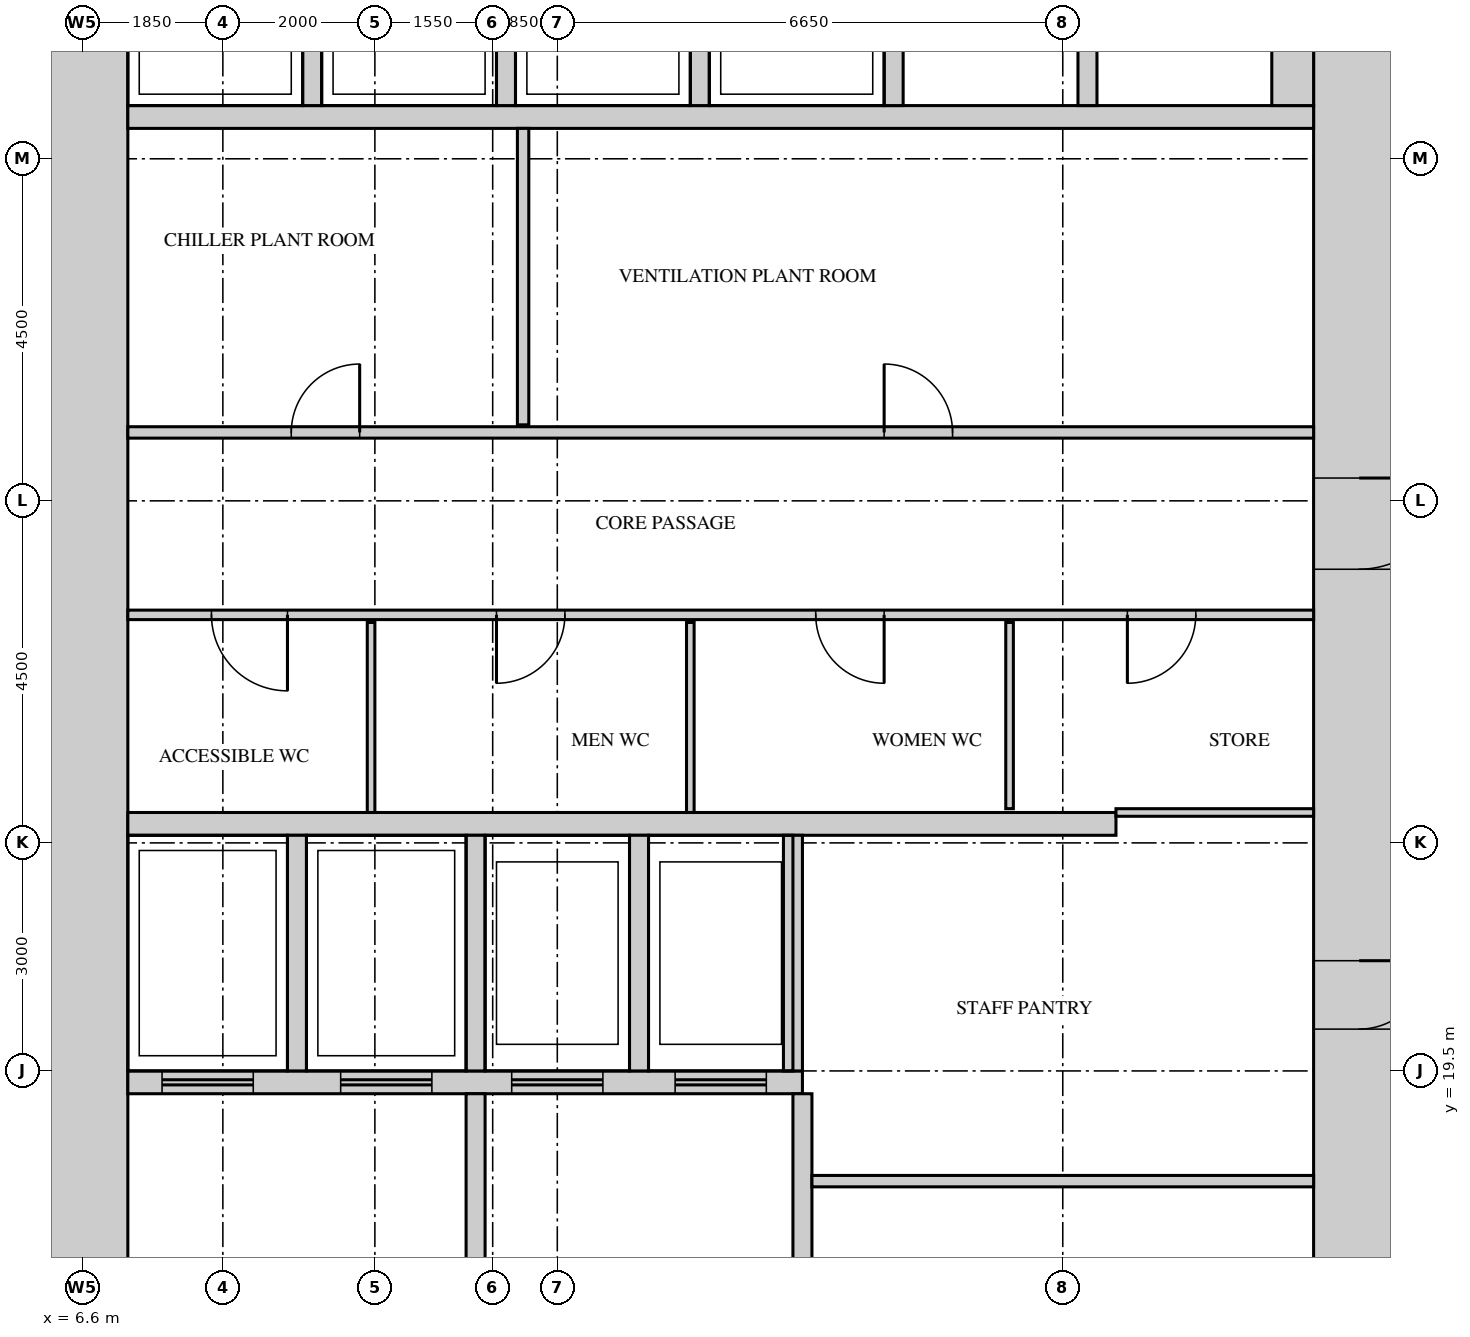
"""IFC4 building model, lengths in metres.
Left out: names, types, materials, properties, quantities, classifications, styles, units other than length and angle.
Written with IfcOpenShell. Run it as: python <this file> out.ifc"""

import sys

from ifc_helpers import new_model, si_unit, direction, frame, frame_2d, origin, place, context, subcontext, project, spatial, rectangle, extrude, source, transform, mapped, element, fill, save


model = new_model("IFC4")
c1 = context("Model", 3, precision=1e-05, world=origin(), true_north=direction((0.0, 1.0)))
c2 = subcontext(c1, "Body", "Model", "MODEL_VIEW")
j1 = project(units=[si_unit("LENGTHUNIT", "METRE"), si_unit("PLANEANGLEUNIT", "RADIAN")], contexts=[c1])
p1 = place(None, origin())
s1 = spatial("IfcSite", under=j1, at=p1, CompositionType="ELEMENT")
p2 = place(p1, origin())
s2 = spatial("IfcBuilding", under=s1, at=p2, CompositionType="ELEMENT")
p3 = place(p2, frame((0.0, 0.0, 87.0)))
s3 = spatial("IfcBuildingStorey", under=s2, at=p3, CompositionType="ELEMENT", Elevation=87.0)
m1 = source(origin(), c2, "Body", "SweptSolid", [
    extrude(rectangle(XDim=27.6, YDim=1.2, at=frame_2d((13.8, 0.0))), origin(), (0.0, 0.0, 1.0), 4.2),
])
p4 = place(p3, frame((23.4, 13.2, 0.0), z_axis=(0.0, 0.0, 1.0), x_axis=(0.0, 1.0, 0.0)))
e1 = element("IfcWall", 1, at=p4, inside=s3, PredefinedType="SHEAR", context=c2, shape_type="MappedRepresentation", body=[
    mapped(m1, transform((0.0, 0.0, 0.0))),
])
m2 = source(origin(), c2, "Body", "SweptSolid", [
    extrude(rectangle(XDim=1.8, YDim=2.1, at=frame_2d((0.9, 1.05))), frame((0.0, 0.61, 0.0), z_axis=(0.0, -1.0, 0.0), x_axis=(1.0, 0.0, 0.0)), (0.0, 0.0, 1.0), 1.22),
])
p5 = place(p4, frame((22.4, 0.0, 0.0)))
e2 = element("IfcOpeningElement", 2, at=p5, cuts=e1, PredefinedType="OPENING", context=c2, shape_type="MappedRepresentation", body=[
    mapped(m2, transform((0.0, 0.0, 0.0))),
])
m3 = source(origin(), c2, "Body", "SweptSolid", [
    extrude(rectangle(XDim=1.2, YDim=2.1, at=frame_2d((0.6, 1.05))), frame((0.0, 0.61, 0.0), z_axis=(0.0, -1.0, 0.0), x_axis=(1.0, 0.0, 0.0)), (0.0, 0.0, 1.0), 1.22),
])
p6 = place(p4, frame((12.9, 0.0, 0.0)))
e3 = element("IfcOpeningElement", 3, at=p6, cuts=e1, PredefinedType="OPENING", context=c2, shape_type="MappedRepresentation", body=[
    mapped(m3, transform((0.0, 0.0, 0.0))),
])
m4 = source(origin(), c2, "Body", "SweptSolid", [
    extrude(rectangle(XDim=0.9, YDim=2.1, at=frame_2d((0.45, 1.05))), frame((0.0, 0.61, 0.0), z_axis=(0.0, -1.0, 0.0), x_axis=(1.0, 0.0, 0.0)), (0.0, 0.0, 1.0), 1.22),
])
p7 = place(p4, frame((2.0, 0.0, 0.0)))
e4 = element("IfcOpeningElement", 4, at=p7, cuts=e1, PredefinedType="OPENING", context=c2, shape_type="MappedRepresentation", body=[
    mapped(m4, transform((0.0, 0.0, 0.0))),
])
p8 = place(p4, frame((6.85, 0.0, 0.0)))
e5 = element("IfcOpeningElement", 5, at=p8, cuts=e1, PredefinedType="OPENING", context=c2, shape_type="MappedRepresentation", body=[
    mapped(m4, transform((0.0, 0.0, 0.0))),
])
p9 = place(p3, frame((6.6, 13.2, 0.0), z_axis=(0.0, 0.0, 1.0), x_axis=(0.0, 1.0, 0.0)))
e6 = element("IfcWall", 6, at=p9, inside=s3, PredefinedType="SHEAR", context=c2, shape_type="MappedRepresentation", body=[
    mapped(m1, transform((0.0, 0.0, 0.0))),
])
m5 = source(origin(), c2, "Body", "SweptSolid", [
    extrude(rectangle(XDim=13.0, YDim=0.3, at=frame_2d((6.5, 0.0))), origin(), (0.0, 0.0, 1.0), 4.2),
])
p10 = place(p3, frame((7.2, 22.75, 0.0), z_axis=(0.0, 0.0, 1.0), x_axis=(1.0, 0.0, 0.0)))
e7 = element("IfcWall", 7, at=p10, inside=s3, PredefinedType="STANDARD", context=c2, shape_type="MappedRepresentation", body=[
    mapped(m5, transform((0.0, 0.0, 0.0))),
])
m6 = source(origin(), c2, "Body", "SweptSolid", [
    extrude(rectangle(XDim=8.875, YDim=0.3, at=frame_2d((4.438, 0.0))), origin(), (0.0, 0.0, 1.0), 4.2),
])
p11 = place(p3, frame((7.2, 19.35, 0.0), z_axis=(0.0, 0.0, 1.0), x_axis=(1.0, 0.0, 0.0)))
e8 = element("IfcWall", 8, at=p11, inside=s3, PredefinedType="STANDARD", context=c2, shape_type="MappedRepresentation", body=[
    mapped(m6, transform((0.0, 0.0, 0.0))),
])
m7 = source(origin(), c2, "Body", "SweptSolid", [
    extrude(rectangle(XDim=1.2, YDim=2.1, at=frame_2d((0.6, 1.05))), frame((0.0, 0.16, 0.0), z_axis=(0.0, -1.0, 0.0), x_axis=(1.0, 0.0, 0.0)), (0.0, 0.0, 1.0), 0.32),
])
p12 = place(p11, frame((0.45, 0.0, 0.0)))
e9 = element("IfcOpeningElement", 9, at=p12, cuts=e8, PredefinedType="OPENING", context=c2, shape_type="MappedRepresentation", body=[
    mapped(m7, transform((0.0, 0.0, 0.0))),
])
p13 = place(p11, frame((2.8, 0.0, 0.0)))
e10 = element("IfcOpeningElement", 10, at=p13, cuts=e8, PredefinedType="OPENING", context=c2, shape_type="MappedRepresentation", body=[
    mapped(m7, transform((0.0, 0.0, 0.0))),
])
p14 = place(p11, frame((5.05, 0.0, 0.0)))
e11 = element("IfcOpeningElement", 11, at=p14, cuts=e8, PredefinedType="OPENING", context=c2, shape_type="MappedRepresentation", body=[
    mapped(m7, transform((0.0, 0.0, 0.0))),
])
p15 = place(p11, frame((7.2, 0.0, 0.0)))
e12 = element("IfcOpeningElement", 12, at=p15, cuts=e8, PredefinedType="OPENING", context=c2, shape_type="MappedRepresentation", body=[
    mapped(m7, transform((0.0, 0.0, 0.0))),
])
m8 = source(origin(), c2, "Body", "SweptSolid", [
    extrude(rectangle(XDim=15.6, YDim=0.3, at=frame_2d((7.8, 0.0))), origin(), (0.0, 0.0, 1.0), 4.2),
])
p16 = place(p3, frame((7.2, 32.05, 0.0), z_axis=(0.0, 0.0, 1.0), x_axis=(1.0, 0.0, 0.0)))
e13 = element("IfcWall", 13, at=p16, inside=s3, PredefinedType="STANDARD", context=c2, shape_type="MappedRepresentation", body=[
    mapped(m8, transform((0.0, 0.0, 0.0))),
])
m9 = source(origin(), c2, "Body", "SweptSolid", [
    extrude(rectangle(XDim=3.1, YDim=0.25, at=frame_2d((1.55, 0.0))), origin(), (0.0, 0.0, 1.0), 4.2),
])
for number, where, z_axis, x_axis in (
    (14, (9.425, 19.5, 0.0), (0.0, 0.0, 1.0), (0.0, 1.0, 0.0)),
    (15, (11.775, 19.5, 0.0), (0.0, 0.0, 1.0), (0.0, 1.0, 0.0)),
    (16, (13.925, 19.5, 0.0), (0.0, 0.0, 1.0), (0.0, 1.0, 0.0)),
    (17, (15.95, 19.5, 0.0), (0.0, 0.0, 1.0), (0.0, 1.0, 0.0)),
):
    element("IfcWall", number, at=place(p3, frame(where, z_axis=z_axis, x_axis=x_axis)), inside=s3, PredefinedType="STANDARD", context=c2, shape_type="MappedRepresentation", body=[
        mapped(m9, transform((0.0, 0.0, 0.0))),
    ])
m10 = source(origin(), c2, "Body", "SweptSolid", [
    extrude(rectangle(XDim=2.4, YDim=0.25, at=frame_2d((1.2, 0.0))), origin(), (0.0, 0.0, 1.0), 4.2),
])
for number, where, z_axis, x_axis in (
    (18, (9.625, 32.2, 0.0), (0.0, 0.0, 1.0), (0.0, 1.0, 0.0)),
    (19, (12.175, 32.2, 0.0), (0.0, 0.0, 1.0), (0.0, 1.0, 0.0)),
    (20, (14.725, 32.2, 0.0), (0.0, 0.0, 1.0), (0.0, 1.0, 0.0)),
    (21, (17.275, 32.2, 0.0), (0.0, 0.0, 1.0), (0.0, 1.0, 0.0)),
    (22, (19.825, 32.2, 0.0), (0.0, 0.0, 1.0), (0.0, 1.0, 0.0)),
):
    element("IfcWall", number, at=place(p3, frame(where, z_axis=z_axis, x_axis=x_axis)), inside=s3, PredefinedType="STANDARD", context=c2, shape_type="MappedRepresentation", body=[
        mapped(m10, transform((0.0, 0.0, 0.0))),
    ])
m11 = source(origin(), c2, "Body", "SweptSolid", [
    extrude(rectangle(XDim=2.4, YDim=0.55, at=frame_2d((1.2, 0.0))), origin(), (0.0, 0.0, 1.0), 4.2),
])
p17 = place(p3, frame((22.525, 32.2, 0.0), z_axis=(0.0, 0.0, 1.0), x_axis=(0.0, 1.0, 0.0)))
e23 = element("IfcWall", 23, at=p17, inside=s3, PredefinedType="STANDARD", context=c2, shape_type="MappedRepresentation", body=[
    mapped(m11, transform((0.0, 0.0, 0.0))),
])
m12 = source(origin(), c2, "Body", "SweptSolid", [
    extrude(rectangle(XDim=3.4, YDim=0.25, at=frame_2d((1.7, 0.0))), origin(), (0.0, 0.0, 1.0), 4.2),
])
for number, where, z_axis, x_axis in (
    (24, (16.075, 15.8, 0.0), (0.0, 0.0, 1.0), (0.0, 1.0, 0.0)),
    (25, (11.775, 15.8, 0.0), (0.0, 0.0, 1.0), (0.0, 1.0, 0.0)),
):
    element("IfcWall", number, at=place(p3, frame(where, z_axis=z_axis, x_axis=x_axis)), inside=s3, PredefinedType="STANDARD", context=c2, shape_type="MappedRepresentation", body=[
        mapped(m12, transform((0.0, 0.0, 0.0))),
    ])
m13 = source(origin(), c2, "Body", "SweptSolid", [
    extrude(rectangle(XDim=6.6, YDim=0.15, at=frame_2d((3.3, 0.0))), origin(), (0.0, 0.0, 1.0), 4.3),
])
p18 = place(p3, frame((16.2, 18.05, 0.0), z_axis=(0.0, 0.0, 1.0), x_axis=(1.0, 0.0, 0.0)))
e26 = element("IfcWall", 26, at=p18, inside=s3, PredefinedType="PARTITIONING", context=c2, shape_type="MappedRepresentation", body=[
    mapped(m13, transform((0.0, 0.0, 0.0))),
])
m14 = source(origin(), c2, "Body", "SweptSolid", [
    extrude(rectangle(XDim=2.5, YDim=0.1, at=frame_2d((1.25, 0.0))), origin(), (0.0, 0.0, 1.0), 4.3),
])
for number, where, z_axis, x_axis in (
    (27, (10.4, 22.9, 0.0), (0.0, 0.0, 1.0), (0.0, 1.0, 0.0)),
    (28, (14.6, 22.9, 0.0), (0.0, 0.0, 1.0), (0.0, 1.0, 0.0)),
):
    element("IfcWall", number, at=place(p3, frame(where, z_axis=z_axis, x_axis=x_axis)), inside=s3, PredefinedType="PARTITIONING", context=c2, shape_type="MappedRepresentation", body=[
        mapped(m14, transform((0.0, 0.0, 0.0))),
    ])
m15 = source(origin(), c2, "Body", "SweptSolid", [
    extrude(rectangle(XDim=2.6, YDim=0.1, at=frame_2d((1.3, 0.0))), origin(), (0.0, 0.0, 1.0), 4.3),
])
p19 = place(p3, frame((20.2, 22.9, 0.0), z_axis=(0.0, 0.0, 1.0), x_axis=(1.0, 0.0, 0.0)))
e29 = element("IfcWall", 29, at=p19, inside=s3, PredefinedType="PARTITIONING", context=c2, shape_type="MappedRepresentation", body=[
    mapped(m15, transform((0.0, 0.0, 0.0))),
])
m16 = source(origin(), c2, "Body", "SweptSolid", [
    extrude(rectangle(XDim=2.45, YDim=0.1, at=frame_2d((1.225, 0.0))), origin(), (0.0, 0.0, 1.0), 4.3),
])
p20 = place(p3, frame((18.8, 22.95, 0.0), z_axis=(0.0, 0.0, 1.0), x_axis=(0.0, 1.0, 0.0)))
e30 = element("IfcWall", 30, at=p20, inside=s3, PredefinedType="PARTITIONING", context=c2, shape_type="MappedRepresentation", body=[
    mapped(m16, transform((0.0, 0.0, 0.0))),
])
m17 = source(origin(), c2, "Body", "SweptSolid", [
    extrude(rectangle(XDim=15.6, YDim=0.125, at=frame_2d((7.8, 0.0))), origin(), (0.0, 0.0, 1.0), 4.3),
])
p21 = place(p3, frame((7.2, 25.5, 0.0), z_axis=(0.0, 0.0, 1.0), x_axis=(1.0, 0.0, 0.0)))
e31 = element("IfcWall", 31, at=p21, inside=s3, PredefinedType="PARTITIONING", context=c2, shape_type="MappedRepresentation", body=[
    mapped(m17, transform((0.0, 0.0, 0.0))),
])
m18 = source(origin(), c2, "Body", "SweptSolid", [
    extrude(rectangle(XDim=1.0, YDim=2.1, at=frame_2d((0.5, 1.05))), frame((0.0, 0.073, 0.0), z_axis=(0.0, -1.0, 0.0), x_axis=(1.0, 0.0, 0.0)), (0.0, 0.0, 1.0), 0.145),
])
p22 = place(p21, frame((1.1, 0.0, 0.0)))
e32 = element("IfcOpeningElement", 32, at=p22, cuts=e31, PredefinedType="OPENING", context=c2, shape_type="MappedRepresentation", body=[
    mapped(m18, transform((0.0, 0.0, 0.0))),
])
m19 = source(origin(), c2, "Body", "SweptSolid", [
    extrude(rectangle(XDim=0.9, YDim=2.1, at=frame_2d((0.45, 1.05))), frame((0.0, 0.073, 0.0), z_axis=(0.0, -1.0, 0.0), x_axis=(1.0, 0.0, 0.0)), (0.0, 0.0, 1.0), 0.145),
])
p23 = place(p21, frame((4.85, 0.0, 0.0)))
e33 = element("IfcOpeningElement", 33, at=p23, cuts=e31, PredefinedType="OPENING", context=c2, shape_type="MappedRepresentation", body=[
    mapped(m19, transform((0.0, 0.0, 0.0))),
])
p24 = place(p21, frame((9.05, 0.0, 0.0)))
e34 = element("IfcOpeningElement", 34, at=p24, cuts=e31, PredefinedType="OPENING", context=c2, shape_type="MappedRepresentation", body=[
    mapped(m19, transform((0.0, 0.0, 0.0))),
])
p25 = place(p21, frame((13.15, 0.0, 0.0)))
e35 = element("IfcOpeningElement", 35, at=p25, cuts=e31, PredefinedType="OPENING", context=c2, shape_type="MappedRepresentation", body=[
    mapped(m19, transform((0.0, 0.0, 0.0))),
])
m20 = source(origin(), c2, "Body", "SweptSolid", [
    extrude(rectangle(XDim=15.6, YDim=0.15, at=frame_2d((7.8, 0.0))), origin(), (0.0, 0.0, 1.0), 4.3),
])
p26 = place(p3, frame((7.2, 27.9, 0.0), z_axis=(0.0, 0.0, 1.0), x_axis=(1.0, 0.0, 0.0)))
e36 = element("IfcWall", 36, at=p26, inside=s3, PredefinedType="PARTITIONING", context=c2, shape_type="MappedRepresentation", body=[
    mapped(m20, transform((0.0, 0.0, 0.0))),
])
m21 = source(origin(), c2, "Body", "SweptSolid", [
    extrude(rectangle(XDim=0.9, YDim=2.1, at=frame_2d((0.45, 1.05))), frame((0.0, 0.085, 0.0), z_axis=(0.0, -1.0, 0.0), x_axis=(1.0, 0.0, 0.0)), (0.0, 0.0, 1.0), 0.17),
])
p27 = place(p26, frame((2.15, 0.0, 0.0)))
e37 = element("IfcOpeningElement", 37, at=p27, cuts=e36, PredefinedType="OPENING", context=c2, shape_type="MappedRepresentation", body=[
    mapped(m21, transform((0.0, 0.0, 0.0))),
])
p28 = place(p26, frame((9.95, 0.0, 0.0)))
e38 = element("IfcOpeningElement", 38, at=p28, cuts=e36, PredefinedType="OPENING", context=c2, shape_type="MappedRepresentation", body=[
    mapped(m21, transform((0.0, 0.0, 0.0))),
])
m22 = source(origin(), c2, "Body", "SweptSolid", [
    extrude(rectangle(XDim=3.9, YDim=0.15, at=frame_2d((1.95, 0.0))), origin(), (0.0, 0.0, 1.0), 4.3),
])
p29 = place(p3, frame((12.4, 28.0, 0.0), z_axis=(0.0, 0.0, 1.0), x_axis=(0.0, 1.0, 0.0)))
e39 = element("IfcWall", 39, at=p29, inside=s3, PredefinedType="PARTITIONING", context=c2, shape_type="MappedRepresentation", body=[
    mapped(m22, transform((0.0, 0.0, 0.0))),
])
m23 = source(origin(), c2, "Body", "SweptSolid", [
    extrude(rectangle(XDim=1.2, YDim=2.1, at=frame_2d((0.6, 1.05))), frame((0.0, 0.55, 0.0), z_axis=(0.0, -1.0, 0.0), x_axis=(1.0, 0.0, 0.0)), (0.0, 0.0, 1.0), 1.1),
])
p30 = place(p6, origin())
e40 = element("IfcDoor", 40, at=p30, inside=s3, OperationType="SINGLE_SWING_RIGHT", PredefinedType="DOOR", context=c2, shape_type="MappedRepresentation", body=[
    mapped(m23, transform((0.0, 0.0, 0.0))),
])
fill(e3, e40)
m24 = source(origin(), c2, "Body", "SweptSolid", [
    extrude(rectangle(XDim=0.9, YDim=2.1, at=frame_2d((0.45, 1.05))), frame((0.0, 0.025, 0.0), z_axis=(0.0, -1.0, 0.0), x_axis=(1.0, 0.0, 0.0)), (0.0, 0.0, 1.0), 0.05),
])
p31 = place(p27, origin())
e41 = element("IfcDoor", 41, at=p31, inside=s3, OperationType="SINGLE_SWING_LEFT", PredefinedType="DOOR", context=c2, shape_type="MappedRepresentation", body=[
    mapped(m24, transform((0.0, 0.0, 0.0))),
])
fill(e37, e41)
p32 = place(p28, origin())
e42 = element("IfcDoor", 42, at=p32, inside=s3, OperationType="SINGLE_SWING_RIGHT", PredefinedType="DOOR", context=c2, shape_type="MappedRepresentation", body=[
    mapped(m24, transform((0.0, 0.0, 0.0))),
])
fill(e38, e42)
m25 = source(origin(), c2, "Body", "SweptSolid", [
    extrude(rectangle(XDim=1.0, YDim=2.1, at=frame_2d((0.5, 1.05))), frame((0.0, 0.025, 0.0), z_axis=(0.0, -1.0, 0.0), x_axis=(1.0, 0.0, 0.0)), (0.0, 0.0, 1.0), 0.05),
])
p33 = place(p22, origin())
e43 = element("IfcDoor", 43, at=p33, inside=s3, OperationType="SINGLE_SWING_RIGHT", PredefinedType="DOOR", context=c2, shape_type="MappedRepresentation", body=[
    mapped(m25, transform((0.0, 0.0, 0.0))),
])
fill(e32, e43)
p34 = place(p23, origin())
e44 = element("IfcDoor", 44, at=p34, inside=s3, OperationType="SINGLE_SWING_LEFT", PredefinedType="DOOR", context=c2, shape_type="MappedRepresentation", body=[
    mapped(m24, transform((0.0, 0.0, 0.0))),
])
fill(e33, e44)
p35 = place(p24, origin())
e45 = element("IfcDoor", 45, at=p35, inside=s3, OperationType="SINGLE_SWING_RIGHT", PredefinedType="DOOR", context=c2, shape_type="MappedRepresentation", body=[
    mapped(m24, transform((0.0, 0.0, 0.0))),
])
fill(e34, e45)
p36 = place(p25, origin())
e46 = element("IfcDoor", 46, at=p36, inside=s3, OperationType="SINGLE_SWING_LEFT", PredefinedType="DOOR", context=c2, shape_type="MappedRepresentation", body=[
    mapped(m24, transform((0.0, 0.0, 0.0))),
])
fill(e35, e46)
m26 = source(origin(), c2, "Body", "SweptSolid", [
    extrude(rectangle(XDim=0.9, YDim=2.1, at=frame_2d((0.45, 1.05))), frame((0.0, 0.55, 0.0), z_axis=(0.0, -1.0, 0.0), x_axis=(1.0, 0.0, 0.0)), (0.0, 0.0, 1.0), 1.1),
])
p37 = place(p8, origin())
e47 = element("IfcDoor", 47, at=p37, inside=s3, OperationType="SINGLE_SWING_RIGHT", PredefinedType="DOOR", context=c2, shape_type="MappedRepresentation", body=[
    mapped(m26, transform((0.0, 0.0, 0.0))),
])
fill(e5, e47)
m27 = source(origin(), c2, "Body", "SweptSolid", [
    extrude(rectangle(XDim=1.2, YDim=2.1, at=frame_2d((0.6, 1.05))), frame((0.0, 0.025, 0.0), z_axis=(0.0, -1.0, 0.0), x_axis=(1.0, 0.0, 0.0)), (0.0, 0.0, 1.0), 0.05),
])
p38 = place(p12, origin())
e48 = element("IfcDoor", 48, at=p38, inside=s3, OperationType="DOUBLE_DOOR_SLIDING", PredefinedType="DOOR", context=c2, shape_type="MappedRepresentation", body=[
    mapped(m27, transform((0.0, 0.0, 0.0))),
])
fill(e9, e48)
p39 = place(p13, origin())
e49 = element("IfcDoor", 49, at=p39, inside=s3, OperationType="DOUBLE_DOOR_SLIDING", PredefinedType="DOOR", context=c2, shape_type="MappedRepresentation", body=[
    mapped(m27, transform((0.0, 0.0, 0.0))),
])
fill(e10, e49)
p40 = place(p14, origin())
e50 = element("IfcDoor", 50, at=p40, inside=s3, OperationType="DOUBLE_DOOR_SLIDING", PredefinedType="DOOR", context=c2, shape_type="MappedRepresentation", body=[
    mapped(m27, transform((0.0, 0.0, 0.0))),
])
fill(e11, e50)
p41 = place(p15, origin())
e51 = element("IfcDoor", 51, at=p41, inside=s3, OperationType="DOUBLE_DOOR_SLIDING", PredefinedType="DOOR", context=c2, shape_type="MappedRepresentation", body=[
    mapped(m27, transform((0.0, 0.0, 0.0))),
])
fill(e12, e51)
save(model, sys.argv[1])
